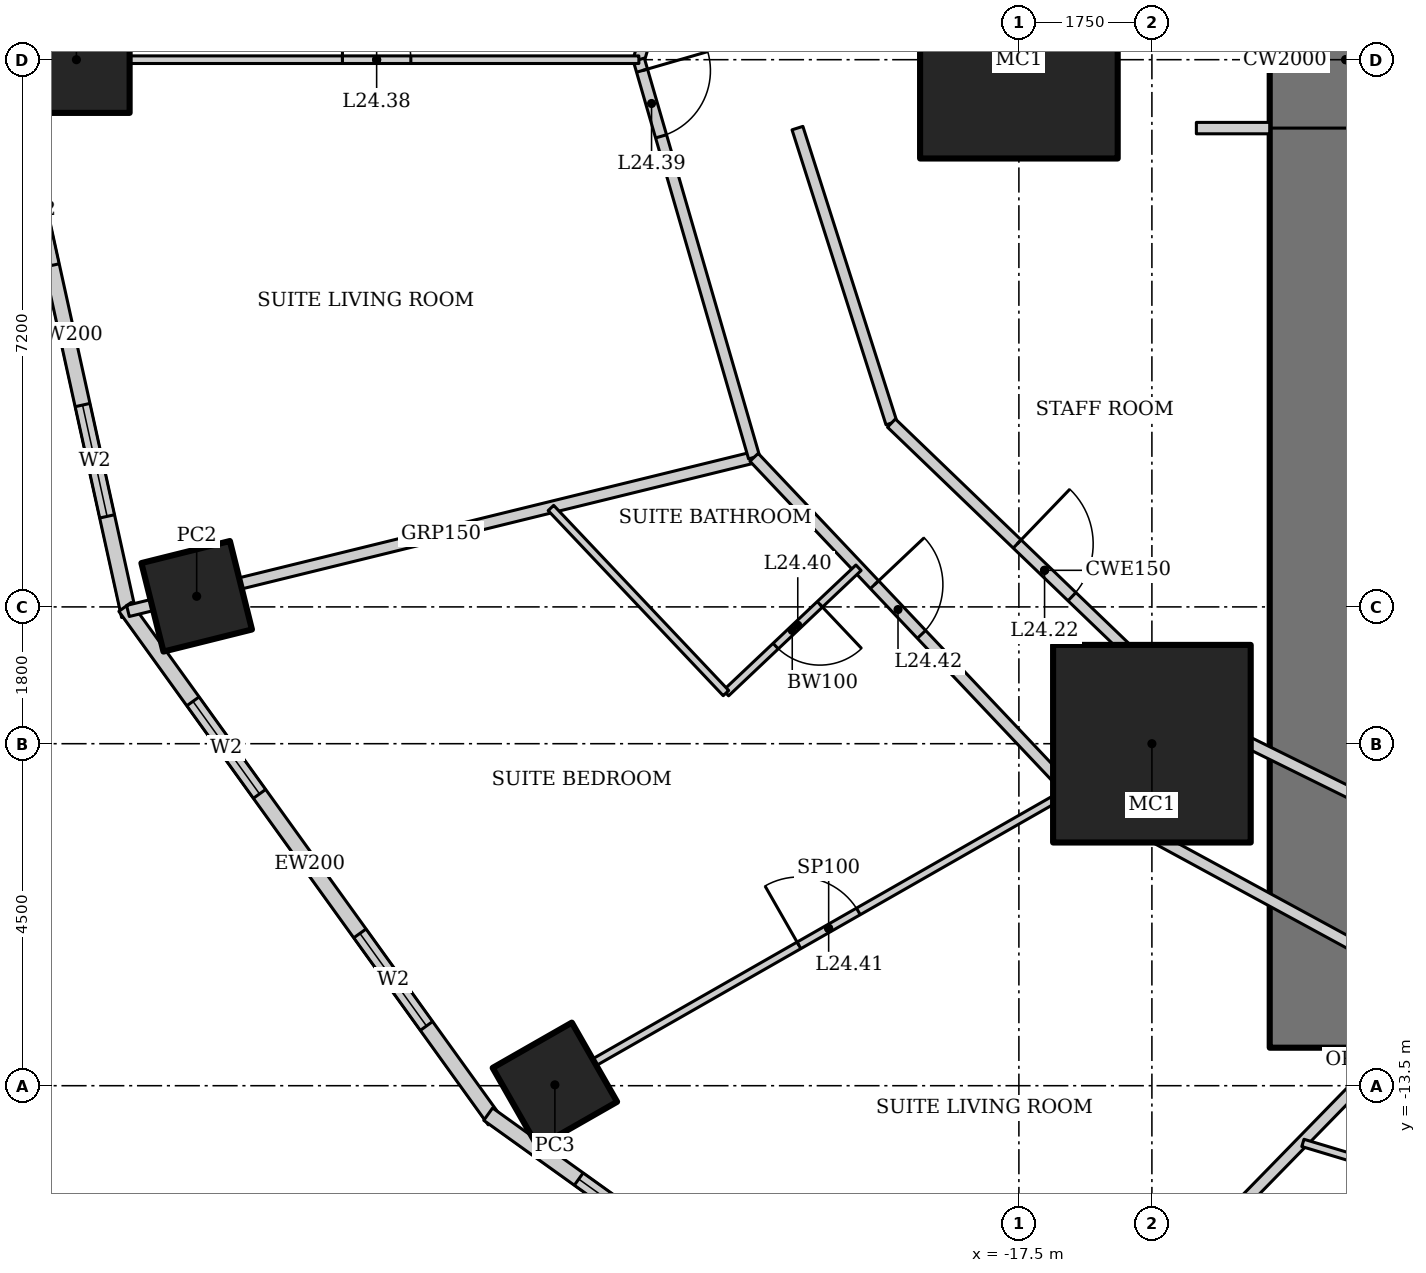
"""IFC4 building model, lengths in metres.
Left out: names, types, materials, properties, quantities, classifications, styles, units other than length and angle.
Written with IfcOpenShell. Run it as: python <this file> out.ifc"""

import sys

from ifc_helpers import new_model, si_unit, direction, frame, frame_2d, origin, origin_2d, place, context, subcontext, project, spatial, rectangle, hollow_rectangle, extrude, element, fill, save


model = new_model("IFC4")
c1 = context("Model", 3, precision=1e-05, world=origin(), true_north=direction((0.0, 1.0)))
c2 = subcontext(c1, "Body", "Model", "MODEL_VIEW")
j1 = project(units=[si_unit("LENGTHUNIT", "METRE"), si_unit("PLANEANGLEUNIT", "RADIAN")], contexts=[c1])
p1 = place(None, origin())
s1 = spatial("IfcSite", under=j1, at=p1, CompositionType="ELEMENT")
p2 = place(p1, origin())
s2 = spatial("IfcBuilding", under=s1, at=p2, CompositionType="ELEMENT")
p3 = place(p2, frame((0.0, 0.0, 101.8)))
s3 = spatial("IfcBuildingStorey", under=s2, at=p3, CompositionType="ELEMENT", Elevation=101.8)
for number, where, z_axis, x_axis in (
    (1, (-17.5, 0.0, 0.0), (0.0, 0.0, 1.0), (1.0, 0.0, 0.0)),
    (2, (-15.75, -9.0, 0.0), (0.0, 0.0, 1.0), (1.0, 0.0, 0.0)),
):
    element("IfcColumn", number, at=place(p3, frame(where, z_axis=z_axis, x_axis=x_axis)), inside=s3, PredefinedType="COLUMN", context=c2, shape_type="SweptSolid", body=[
        extrude(hollow_rectangle(XDim=2.6, YDim=2.6, WallThickness=0.13, at=origin_2d()), origin(), (0.0, 0.0, 1.0), 3.6),
    ])
p4 = place(p3, frame((-29.9, 0.0, 0.0), z_axis=(0.0, 0.0, 1.0), x_axis=(1.0, 0.0, 0.0)))
e3 = element("IfcColumn", 3, at=p4, inside=s3, PredefinedType="COLUMN", context=c2, shape_type="SweptSolid", body=[
    extrude(hollow_rectangle(XDim=1.4, YDim=1.4, WallThickness=0.1, at=origin_2d()), origin(), (0.0, 0.0, 1.0), 2.06),
])
p5 = place(p3, frame((-28.318, -7.06, 0.0), z_axis=(0.0, 0.0, 1.0), x_axis=(0.970295726276, 0.2419218956, 0.0)))
e4 = element("IfcColumn", 4, at=p5, inside=s3, PredefinedType="COLUMN", context=c2, shape_type="SweptSolid", body=[
    extrude(hollow_rectangle(XDim=1.2, YDim=1.2, WallThickness=0.1, at=origin_2d()), origin(), (0.0, 0.0, 1.0), 2.28),
])
p6 = place(p3, frame((-23.605, -13.489, 0.0), z_axis=(0.0, 0.0, 1.0), x_axis=(0.86824298017, 0.496139221777, 0.0)))
e5 = element("IfcColumn", 5, at=p6, inside=s3, PredefinedType="COLUMN", context=c2, shape_type="SweptSolid", body=[
    extrude(hollow_rectangle(XDim=1.2, YDim=1.2, WallThickness=0.12, at=origin_2d()), origin(), (0.0, 0.0, 1.0), 2.28),
])
p7 = place(p3, frame((-13.2, 13.0, 0.0), z_axis=(0.0, 0.0, 1.0), x_axis=(0.0, -1.0, 0.0)))
e6 = element("IfcWall", 6, at=p7, inside=s3, PredefinedType="SHEAR", context=c2, shape_type="SweptSolid", body=[
    extrude(rectangle(XDim=26.0, YDim=2.0, at=frame_2d((13.0, 0.0))), origin(), (0.0, 0.0, 1.0), 3.6),
])
p8 = place(p7, frame((12.1, 0.0, 0.0)))
e7 = element("IfcOpeningElement", 7, at=p8, cuts=e6, PredefinedType="OPENING", context=c2, shape_type="SweptSolid", body=[
    extrude(rectangle(XDim=1.8, YDim=2.1, at=frame_2d((0.9, 1.05))), frame((0.0, 1.01, 0.0), z_axis=(0.0, -1.0, 0.0), x_axis=(1.0, 0.0, 0.0)), (0.0, 0.0, 1.0), 2.02),
])
p9 = place(p3, frame((-29.208, 7.318, 0.0), z_axis=(0.0, 0.0, 1.0), x_axis=(-0.215238065514, -0.976561608478, 0.0)))
e8 = element("IfcWall", 8, at=p9, inside=s3, PredefinedType="SOLIDWALL", context=c2, shape_type="SweptSolid", body=[
    extrude(rectangle(XDim=7.562, YDim=0.2, at=frame_2d((3.781, 0.0))), origin(), (0.0, 0.0, 1.0), 3.4),
])
p10 = place(p9, frame((1.341, 0.0, 0.5)))
e9 = element("IfcOpeningElement", 9, at=p10, cuts=e8, PredefinedType="OPENING", context=c2, shape_type="SweptSolid", body=[
    extrude(rectangle(XDim=1.5, YDim=2.2, at=frame_2d((0.75, 1.1))), frame((0.0, 0.11, 0.0), z_axis=(0.0, -1.0, 0.0), x_axis=(1.0, 0.0, 0.0)), (0.0, 0.0, 1.0), 0.22),
])
p11 = place(p9, frame((4.722, 0.0, 0.5)))
e10 = element("IfcOpeningElement", 10, at=p11, cuts=e8, PredefinedType="OPENING", context=c2, shape_type="SweptSolid", body=[
    extrude(rectangle(XDim=1.5, YDim=2.2, at=frame_2d((0.75, 1.1))), frame((0.0, 0.11, 0.0), z_axis=(0.0, -1.0, 0.0), x_axis=(1.0, 0.0, 0.0)), (0.0, 0.0, 1.0), 0.22),
])
p12 = place(p3, frame((-30.835, 0.067, 0.0), z_axis=(0.0, 0.0, 1.0), x_axis=(0.215238065514, -0.976561608478, 0.0)))
e11 = element("IfcWall", 11, at=p12, inside=s3, PredefinedType="SOLIDWALL", context=c2, shape_type="SweptSolid", body=[
    extrude(rectangle(XDim=7.562, YDim=0.2, at=frame_2d((3.781, 0.0))), origin(), (0.0, 0.0, 1.0), 3.4),
])
p13 = place(p12, frame((1.341, 0.0, 0.5)))
e12 = element("IfcOpeningElement", 12, at=p13, cuts=e11, PredefinedType="OPENING", context=c2, shape_type="SweptSolid", body=[
    extrude(rectangle(XDim=1.5, YDim=2.2, at=frame_2d((0.75, 1.1))), frame((0.0, 0.11, 0.0), z_axis=(0.0, -1.0, 0.0), x_axis=(1.0, 0.0, 0.0)), (0.0, 0.0, 1.0), 0.22),
])
p14 = place(p12, frame((4.722, 0.0, 0.5)))
e13 = element("IfcOpeningElement", 13, at=p14, cuts=e11, PredefinedType="OPENING", context=c2, shape_type="SweptSolid", body=[
    extrude(rectangle(XDim=1.5, YDim=2.2, at=frame_2d((0.75, 1.1))), frame((0.0, 0.11, 0.0), z_axis=(0.0, -1.0, 0.0), x_axis=(1.0, 0.0, 0.0)), (0.0, 0.0, 1.0), 0.22),
])
p15 = place(p3, frame((-29.26, -7.2, 0.0), z_axis=(0.0, 0.0, 1.0), x_axis=(0.583937613703, -0.811798536155, 0.0)))
e14 = element("IfcWall", 14, at=p15, inside=s3, PredefinedType="SOLIDWALL", context=c2, shape_type="SweptSolid", body=[
    extrude(rectangle(XDim=8.323, YDim=0.2, at=frame_2d((4.162, 0.0))), origin(), (0.0, 0.0, 1.0), 3.4),
])
p16 = place(p15, frame((1.531, 0.0, 0.5)))
e15 = element("IfcOpeningElement", 15, at=p16, cuts=e14, PredefinedType="OPENING", context=c2, shape_type="SweptSolid", body=[
    extrude(rectangle(XDim=1.5, YDim=2.2, at=frame_2d((0.75, 1.1))), frame((0.0, 0.11, 0.0), z_axis=(0.0, -1.0, 0.0), x_axis=(1.0, 0.0, 0.0)), (0.0, 0.0, 1.0), 0.22),
])
p17 = place(p15, frame((5.292, 0.0, 0.5)))
e16 = element("IfcOpeningElement", 16, at=p17, cuts=e14, PredefinedType="OPENING", context=c2, shape_type="SweptSolid", body=[
    extrude(rectangle(XDim=1.5, YDim=2.2, at=frame_2d((0.75, 1.1))), frame((0.0, 0.11, 0.0), z_axis=(0.0, -1.0, 0.0), x_axis=(1.0, 0.0, 0.0)), (0.0, 0.0, 1.0), 0.22),
])
p18 = place(p3, frame((-24.482, -13.875, 0.0), z_axis=(0.0, 0.0, 1.0), x_axis=(0.812791321576, -0.582554948112, 0.0)))
e17 = element("IfcWall", 17, at=p18, inside=s3, PredefinedType="SOLIDWALL", context=c2, shape_type="SweptSolid", body=[
    extrude(rectangle(XDim=8.063, YDim=0.2, at=frame_2d((4.032, 0.0))), origin(), (0.0, 0.0, 1.0), 3.4),
])
p19 = place(p18, frame((1.466, 0.0, 0.5)))
e18 = element("IfcOpeningElement", 18, at=p19, cuts=e17, PredefinedType="OPENING", context=c2, shape_type="SweptSolid", body=[
    extrude(rectangle(XDim=1.5, YDim=2.2, at=frame_2d((0.75, 1.1))), frame((0.0, 0.11, 0.0), z_axis=(0.0, -1.0, 0.0), x_axis=(1.0, 0.0, 0.0)), (0.0, 0.0, 1.0), 0.22),
])
p20 = place(p18, frame((5.097, 0.0, 0.5)))
e19 = element("IfcOpeningElement", 19, at=p20, cuts=e17, PredefinedType="OPENING", context=c2, shape_type="SweptSolid", body=[
    extrude(rectangle(XDim=1.5, YDim=2.2, at=frame_2d((0.75, 1.1))), frame((0.0, 0.11, 0.0), z_axis=(0.0, -1.0, 0.0), x_axis=(1.0, 0.0, 0.0)), (0.0, 0.0, 1.0), 0.22),
])
p21 = place(p3, frame((-29.222, -7.254, 0.0), z_axis=(0.0, 0.0, 1.0), x_axis=(0.971178166182, 0.238354713676, 0.0)))
e20 = element("IfcWall", 20, at=p21, inside=s3, PredefinedType="PARTITIONING", context=c2, shape_type="SweptSolid", body=[
    extrude(rectangle(XDim=8.482, YDim=0.15, at=frame_2d((4.241, 0.0))), origin(), (0.0, 0.0, 1.0), 1.9),
])
p22 = place(p3, frame((-17.97, -18.542, 0.0), z_axis=(0.0, 0.0, 1.0), x_axis=(0.698503223934, 0.715606907564, 0.0)))
e21 = element("IfcWall", 21, at=p22, inside=s3, PredefinedType="PARTITIONING", context=c2, shape_type="SweptSolid", body=[
    extrude(rectangle(XDim=8.707, YDim=0.15, at=frame_2d((4.354, 0.0))), origin(), (0.0, 0.0, 1.0), 2.463),
])
p23 = place(p3, frame((-20.984, 5.232, 0.0), z_axis=(0.0, 0.0, 1.0), x_axis=(-0.278247435376, -0.960509429785, 0.0)))
e22 = element("IfcWall", 22, at=p23, inside=s3, PredefinedType="PARTITIONING", context=c2, shape_type="SweptSolid", body=[
    extrude(rectangle(XDim=5.447, YDim=0.15, at=frame_2d((2.724, 0.0))), origin(), (0.0, 0.0, 1.0), 3.4),
])
p24 = place(p3, frame((-22.5, 0.0, 0.0), z_axis=(0.0, 0.0, 1.0), x_axis=(0.278247435376, -0.960509429785, 0.0)))
e23 = element("IfcWall", 23, at=p24, inside=s3, PredefinedType="PARTITIONING", context=c2, shape_type="SweptSolid", body=[
    extrude(rectangle(XDim=5.447, YDim=0.15, at=frame_2d((2.724, 0.0))), origin(), (0.0, 0.0, 1.0), 3.4),
])
p25 = place(p24, frame((0.15, 0.0, 0.0)))
e24 = element("IfcOpeningElement", 24, at=p25, cuts=e23, PredefinedType="OPENING", context=c2, shape_type="SweptSolid", body=[
    extrude(rectangle(XDim=0.9, YDim=2.1, at=frame_2d((0.45, 1.05))), frame((0.0, 0.085, 0.0), z_axis=(0.0, -1.0, 0.0), x_axis=(1.0, 0.0, 0.0)), (0.0, 0.0, 1.0), 0.17),
])
p26 = place(p3, frame((-20.984, -5.232, 0.0), z_axis=(0.0, 0.0, 1.0), x_axis=(0.687062608696, -0.726598218916, 0.0)))
e25 = element("IfcWall", 25, at=p26, inside=s3, PredefinedType="PARTITIONING", context=c2, shape_type="SweptSolid", body=[
    extrude(rectangle(XDim=6.039, YDim=0.15, at=frame_2d((3.02, 0.0))), origin(), (0.0, 0.0, 1.0), 3.4),
])
p27 = place(p26, frame((2.306, 0.0, 0.0)))
e26 = element("IfcOpeningElement", 26, at=p27, cuts=e25, PredefinedType="OPENING", context=c2, shape_type="SweptSolid", body=[
    extrude(rectangle(XDim=0.9, YDim=2.1, at=frame_2d((0.45, 1.05))), frame((0.0, 0.085, 0.0), z_axis=(0.0, -1.0, 0.0), x_axis=(1.0, 0.0, 0.0)), (0.0, 0.0, 1.0), 0.17),
])
p28 = place(p3, frame((-16.835, -9.62, 0.0), z_axis=(0.0, 0.0, 1.0), x_axis=(0.878450059298, -0.477834169267, 0.0)))
e27 = element("IfcWall", 27, at=p28, inside=s3, PredefinedType="PARTITIONING", context=c2, shape_type="SweptSolid", body=[
    extrude(rectangle(XDim=5.631, YDim=0.15, at=frame_2d((2.815, 0.0))), origin(), (0.0, 0.0, 1.0), 3.4),
])
p29 = place(p3, frame((-20.413, -0.9, 0.0), z_axis=(0.0, 0.0, 1.0), x_axis=(0.303505448228, -0.952829702988, 0.0)))
e28 = element("IfcWall", 28, at=p29, inside=s3, PredefinedType="PARTITIONING", context=c2, shape_type="SweptSolid", body=[
    extrude(rectangle(XDim=4.073, YDim=0.15, at=frame_2d((2.037, 0.0))), origin(), (0.0, 0.0, 1.0), 3.4),
])
p30 = place(p3, frame((-19.177, -4.781, 0.0), z_axis=(0.0, 0.0, 1.0), x_axis=(0.720837261072, -0.693104352209, 0.0)))
e29 = element("IfcWall", 29, at=p30, inside=s3, PredefinedType="PARTITIONING", context=c2, shape_type="SweptSolid", body=[
    extrude(rectangle(XDim=5.59, YDim=0.15, at=frame_2d((2.795, 0.0))), origin(), (0.0, 0.0, 1.0), 3.4),
])
p31 = place(p30, frame((2.295, 0.0, 0.0)))
e30 = element("IfcOpeningElement", 30, at=p31, cuts=e29, PredefinedType="OPENING", context=c2, shape_type="SweptSolid", body=[
    extrude(rectangle(XDim=1.0, YDim=2.1, at=frame_2d((0.5, 1.05))), frame((0.0, 0.085, 0.0), z_axis=(0.0, -1.0, 0.0), x_axis=(1.0, 0.0, 0.0)), (0.0, 0.0, 1.0), 0.17),
])
p32 = place(p3, frame((-15.147, -8.656, 0.0), z_axis=(0.0, 0.0, 1.0), x_axis=(0.89656943448, -0.442903205177, 0.0)))
e31 = element("IfcWall", 31, at=p32, inside=s3, PredefinedType="PARTITIONING", context=c2, shape_type="SweptSolid", body=[
    extrude(rectangle(XDim=5.126, YDim=0.15, at=frame_2d((2.563, 0.0))), origin(), (0.0, 0.0, 1.0), 3.4),
])
p33 = place(p3, frame((-29.4, 0.0, 0.0), z_axis=(0.0, 0.0, 1.0), x_axis=(1.0, 0.0, 0.0)))
e32 = element("IfcWall", 32, at=p33, inside=s3, PredefinedType="PARTITIONING", context=c2, shape_type="SweptSolid", body=[
    extrude(rectangle(XDim=6.9, YDim=0.1, at=frame_2d((3.45, 0.0))), origin(), (0.0, 0.0, 1.0), 2.2),
])
p34 = place(p33, frame((3.0, 0.0, 0.0)))
e33 = element("IfcOpeningElement", 33, at=p34, cuts=e32, PredefinedType="OPENING", context=c2, shape_type="SweptSolid", body=[
    extrude(rectangle(XDim=0.9, YDim=2.1, at=frame_2d((0.45, 1.05))), frame((0.0, 0.06, 0.0), z_axis=(0.0, -1.0, 0.0), x_axis=(1.0, 0.0, 0.0)), (0.0, 0.0, 1.0), 0.12),
])
p35 = place(p3, frame((-19.61, -6.685, 0.0), z_axis=(0.0, 0.0, 1.0), x_axis=(-0.726564480261, -0.687098287018, 0.0)))
e34 = element("IfcWall", 34, at=p35, inside=s3, PredefinedType="PARTITIONING", context=c2, shape_type="SweptSolid", body=[
    extrude(rectangle(XDim=2.4, YDim=0.1, at=frame_2d((1.2, 0.0))), origin(), (0.0, 0.0, 1.0), 3.4),
])
p36 = place(p35, frame((0.7, 0.0, 0.0)))
e35 = element("IfcOpeningElement", 35, at=p36, cuts=e34, PredefinedType="OPENING", context=c2, shape_type="SweptSolid", body=[
    extrude(rectangle(XDim=0.8, YDim=2.1, at=frame_2d((0.4, 1.05))), frame((0.0, 0.06, 0.0), z_axis=(0.0, -1.0, 0.0), x_axis=(1.0, 0.0, 0.0)), (0.0, 0.0, 1.0), 0.12),
])
p37 = place(p3, frame((-21.354, -8.334, 0.0), z_axis=(0.0, 0.0, 1.0), x_axis=(-0.68705752606, 0.726603024963, 0.0)))
e36 = element("IfcWall", 36, at=p37, inside=s3, PredefinedType="PARTITIONING", context=c2, shape_type="SweptSolid", body=[
    extrude(rectangle(XDim=3.352, YDim=0.1, at=frame_2d((1.676, 0.0))), origin(), (0.0, 0.0, 1.0), 3.4),
])
p38 = place(p3, frame((-23.171, -13.24, 0.0), z_axis=(0.0, 0.0, 1.0), x_axis=(0.868253436131, 0.496120923412, 0.0)))
e37 = element("IfcWall", 37, at=p38, inside=s3, PredefinedType="PARTITIONING", context=c2, shape_type="SweptSolid", body=[
    extrude(rectangle(XDim=7.297, YDim=0.1, at=frame_2d((3.649, 0.0))), origin(), (0.0, 0.0, 1.0), 2.2),
])
p39 = place(p38, frame((3.198, 0.0, 0.0)))
e38 = element("IfcOpeningElement", 38, at=p39, cuts=e37, PredefinedType="OPENING", context=c2, shape_type="SweptSolid", body=[
    extrude(rectangle(XDim=0.9, YDim=2.1, at=frame_2d((0.45, 1.05))), frame((0.0, 0.06, 0.0), z_axis=(0.0, -1.0, 0.0), x_axis=(1.0, 0.0, 0.0)), (0.0, 0.0, 1.0), 0.12),
])
p40 = place(p3, frame((-10.665, -15.185, 0.0), z_axis=(0.0, 0.0, 1.0), x_axis=(-0.957568413147, 0.288206061946, 0.0)))
e39 = element("IfcWall", 39, at=p40, inside=s3, PredefinedType="PARTITIONING", context=c2, shape_type="SweptSolid", body=[
    extrude(rectangle(XDim=3.236, YDim=0.1, at=frame_2d((1.618, 0.0))), origin(), (0.0, 0.0, 1.0), 3.4),
])
p41 = place(p3, frame((-13.2, -13.0, 0.0), z_axis=(0.0, 0.0, 1.0), x_axis=(0.715599628005, -0.698510681664, 0.0)))
e40 = element("IfcWall", 40, at=p41, inside=s3, PredefinedType="PARTITIONING", context=c2, shape_type="SweptSolid", body=[
    extrude(rectangle(XDim=0.457, YDim=0.1, at=frame_2d((0.229, 0.0))), origin(), (0.0, 0.0, 1.0), 3.4),
])
p42 = place(p3, frame((-14.2, -0.9, 0.0), z_axis=(0.0, 0.0, 1.0), x_axis=(-1.0, 0.0, 0.0)))
e41 = element("IfcWall", 41, at=p42, inside=s3, PredefinedType="PARTITIONING", context=c2, shape_type="SweptSolid", body=[
    extrude(rectangle(XDim=0.965, YDim=0.15, at=frame_2d((0.482, 0.0))), origin(), (0.0, 0.0, 1.0), 3.4),
])
p43 = place(p13, origin())
e42 = element("IfcWindow", 42, at=p43, inside=s3, PartitioningType="SINGLE_PANEL", PredefinedType="WINDOW", context=c2, shape_type="SweptSolid", body=[
    extrude(rectangle(XDim=1.5, YDim=2.2, at=frame_2d((0.75, 1.1))), frame((0.0, 0.03, 0.0), z_axis=(0.0, -1.0, 0.0), x_axis=(1.0, 0.0, 0.0)), (0.0, 0.0, 1.0), 0.06),
])
fill(e12, e42)
p44 = place(p14, origin())
e43 = element("IfcWindow", 43, at=p44, inside=s3, PartitioningType="SINGLE_PANEL", PredefinedType="WINDOW", context=c2, shape_type="SweptSolid", body=[
    extrude(rectangle(XDim=1.5, YDim=2.2, at=frame_2d((0.75, 1.1))), frame((0.0, 0.03, 0.0), z_axis=(0.0, -1.0, 0.0), x_axis=(1.0, 0.0, 0.0)), (0.0, 0.0, 1.0), 0.06),
])
fill(e13, e43)
p45 = place(p16, origin())
e44 = element("IfcWindow", 44, at=p45, inside=s3, PartitioningType="SINGLE_PANEL", PredefinedType="WINDOW", context=c2, shape_type="SweptSolid", body=[
    extrude(rectangle(XDim=1.5, YDim=2.2, at=frame_2d((0.75, 1.1))), frame((0.0, 0.03, 0.0), z_axis=(0.0, -1.0, 0.0), x_axis=(1.0, 0.0, 0.0)), (0.0, 0.0, 1.0), 0.06),
])
fill(e15, e44)
p46 = place(p17, origin())
e45 = element("IfcWindow", 45, at=p46, inside=s3, PartitioningType="SINGLE_PANEL", PredefinedType="WINDOW", context=c2, shape_type="SweptSolid", body=[
    extrude(rectangle(XDim=1.5, YDim=2.2, at=frame_2d((0.75, 1.1))), frame((0.0, 0.03, 0.0), z_axis=(0.0, -1.0, 0.0), x_axis=(1.0, 0.0, 0.0)), (0.0, 0.0, 1.0), 0.06),
])
fill(e16, e45)
p47 = place(p19, origin())
e46 = element("IfcWindow", 46, at=p47, inside=s3, PartitioningType="SINGLE_PANEL", PredefinedType="WINDOW", context=c2, shape_type="SweptSolid", body=[
    extrude(rectangle(XDim=1.5, YDim=2.2, at=frame_2d((0.75, 1.1))), frame((0.0, 0.03, 0.0), z_axis=(0.0, -1.0, 0.0), x_axis=(1.0, 0.0, 0.0)), (0.0, 0.0, 1.0), 0.06),
])
fill(e18, e46)
p48 = place(p8, origin())
e47 = element("IfcDoor", 47, at=p48, inside=s3, OperationType="DOUBLE_DOOR_DOUBLE_SWING", PredefinedType="DOOR", context=c2, shape_type="SweptSolid", body=[
    extrude(rectangle(XDim=1.8, YDim=2.1, at=frame_2d((0.9, 1.05))), frame((0.0, 0.025, 0.0), z_axis=(0.0, -1.0, 0.0), x_axis=(1.0, 0.0, 0.0)), (0.0, 0.0, 1.0), 0.05),
])
fill(e7, e47)
p49 = place(p31, origin())
e48 = element("IfcDoor", 48, at=p49, inside=s3, OperationType="SINGLE_SWING_LEFT", PredefinedType="DOOR", context=c2, shape_type="SweptSolid", body=[
    extrude(rectangle(XDim=1.0, YDim=2.1, at=frame_2d((0.5, 1.05))), frame((0.0, 0.025, 0.0), z_axis=(0.0, -1.0, 0.0), x_axis=(1.0, 0.0, 0.0)), (0.0, 0.0, 1.0), 0.05),
])
fill(e30, e48)
p50 = place(p34, origin())
e49 = element("IfcDoor", 49, at=p50, inside=s3, OperationType="SINGLE_SWING_LEFT", PredefinedType="DOOR", context=c2, shape_type="SweptSolid", body=[
    extrude(rectangle(XDim=0.9, YDim=2.1, at=frame_2d((0.45, 1.05))), frame((0.0, 0.025, 0.0), z_axis=(0.0, -1.0, 0.0), x_axis=(1.0, 0.0, 0.0)), (0.0, 0.0, 1.0), 0.05),
])
fill(e33, e49)
p51 = place(p25, origin())
e50 = element("IfcDoor", 50, at=p51, inside=s3, OperationType="SINGLE_SWING_LEFT", PredefinedType="DOOR", context=c2, shape_type="SweptSolid", body=[
    extrude(rectangle(XDim=0.9, YDim=2.1, at=frame_2d((0.45, 1.05))), frame((0.0, 0.025, 0.0), z_axis=(0.0, -1.0, 0.0), x_axis=(1.0, 0.0, 0.0)), (0.0, 0.0, 1.0), 0.05),
])
fill(e24, e50)
p52 = place(p36, origin())
e51 = element("IfcDoor", 51, at=p52, inside=s3, OperationType="SINGLE_SWING_LEFT", PredefinedType="DOOR", context=c2, shape_type="SweptSolid", body=[
    extrude(rectangle(XDim=0.8, YDim=2.1, at=frame_2d((0.4, 1.05))), frame((0.0, 0.025, 0.0), z_axis=(0.0, -1.0, 0.0), x_axis=(1.0, 0.0, 0.0)), (0.0, 0.0, 1.0), 0.05),
])
fill(e35, e51)
p53 = place(p39, origin())
e52 = element("IfcDoor", 52, at=p53, inside=s3, OperationType="SINGLE_SWING_LEFT", PredefinedType="DOOR", context=c2, shape_type="SweptSolid", body=[
    extrude(rectangle(XDim=0.9, YDim=2.1, at=frame_2d((0.45, 1.05))), frame((0.0, 0.025, 0.0), z_axis=(0.0, -1.0, 0.0), x_axis=(1.0, 0.0, 0.0)), (0.0, 0.0, 1.0), 0.05),
])
fill(e38, e52)
p54 = place(p27, origin())
e53 = element("IfcDoor", 53, at=p54, inside=s3, OperationType="SINGLE_SWING_LEFT", PredefinedType="DOOR", context=c2, shape_type="SweptSolid", body=[
    extrude(rectangle(XDim=0.9, YDim=2.1, at=frame_2d((0.45, 1.05))), frame((0.0, 0.025, 0.0), z_axis=(0.0, -1.0, 0.0), x_axis=(1.0, 0.0, 0.0)), (0.0, 0.0, 1.0), 0.05),
])
fill(e26, e53)
save(model, sys.argv[1])
